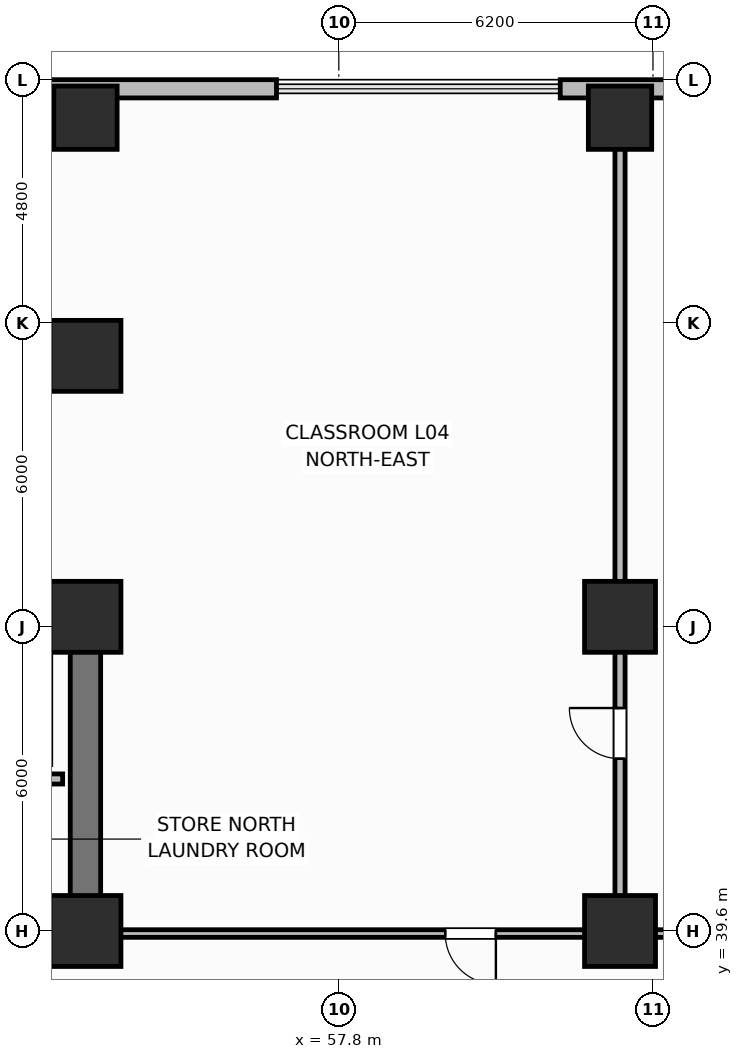
"""IFC4 building model, lengths in metres.
Left out: names, types, materials, properties, quantities, classifications, styles, units other than length and angle.
Written with IfcOpenShell. Run it as: python <this file> out.ifc"""

import sys

from ifc_helpers import new_model, si_unit, direction, frame, frame_2d, origin, origin_2d, place, context, subcontext, project, spatial, rectangle, extrude, element, fill, save


model = new_model("IFC4")
c1 = context("Model", 3, precision=1e-05, world=origin(), true_north=direction((0.0, 1.0)))
c2 = subcontext(c1, "Body", "Model", "MODEL_VIEW")
j1 = project(units=[si_unit("LENGTHUNIT", "METRE"), si_unit("PLANEANGLEUNIT", "RADIAN")], contexts=[c1])
p1 = place(None, origin())
s1 = spatial("IfcSite", under=j1, at=p1, CompositionType="ELEMENT")
p2 = place(p1, origin())
s2 = spatial("IfcBuilding", under=s1, at=p2, CompositionType="ELEMENT")
p3 = place(p2, frame((0.0, 0.0, 20.1)))
s3 = spatial("IfcBuildingStorey", under=s2, at=p3, CompositionType="ELEMENT", Elevation=20.1)
p4 = place(p3, frame((25.6, 45.8, 0.0), z_axis=(0.0, 0.0, 1.0), x_axis=(1.0, 0.0, 0.0)))
e1 = element("IfcWall", 1, at=p4, inside=s3, PredefinedType="SHEAR", context=c2, shape_type="SweptSolid", body=[
    extrude(rectangle(XDim=27.2, YDim=0.6, at=frame_2d((13.6, 0.0))), origin(), (0.0, 0.0, 1.0), 4.5),
])
p5 = place(p3, frame((52.8, 39.9, 0.0), z_axis=(0.0, 0.0, 1.0), x_axis=(0.0, 1.0, 0.0)))
e2 = element("IfcWall", 2, at=p5, inside=s3, PredefinedType="SHEAR", context=c2, shape_type="SweptSolid", body=[
    extrude(rectangle(XDim=5.6, YDim=0.6, at=frame_2d((2.8, 0.0))), origin(), (0.0, 0.0, 1.0), 4.5),
])
p6 = place(p3, frame((52.8, 39.6, 0.0), z_axis=(0.0, 0.0, 1.0), x_axis=(-1.0, 0.0, 0.0)))
e3 = element("IfcWall", 3, at=p6, inside=s3, PredefinedType="SHEAR", context=c2, shape_type="SweptSolid", body=[
    extrude(rectangle(XDim=27.2, YDim=0.6, at=frame_2d((13.6, 0.0))), origin(), (0.0, 0.0, 1.0), 4.5),
])
p7 = place(p6, frame((24.2, 0.0, 0.0)))
e4 = element("IfcOpeningElement", 4, at=p7, cuts=e3, PredefinedType="OPENING", context=c2, shape_type="SweptSolid", body=[
    extrude(rectangle(XDim=1.1, YDim=2.15, at=frame_2d((0.55, 1.075))), frame((0.0, 0.31, 0.0), z_axis=(0.0, -1.0, 0.0), x_axis=(1.0, 0.0, 0.0)), (0.0, 0.0, 1.0), 0.62),
])
p8 = place(p6, frame((20.55, 0.0, 0.0)))
e5 = element("IfcOpeningElement", 5, at=p8, cuts=e3, PredefinedType="OPENING", context=c2, shape_type="SweptSolid", body=[
    extrude(rectangle(XDim=0.95, YDim=2.1, at=frame_2d((0.475, 1.05))), frame((0.0, 0.31, 0.0), z_axis=(0.0, -1.0, 0.0), x_axis=(1.0, 0.0, 0.0)), (0.0, 0.0, 1.0), 0.62),
])
p9 = place(p6, frame((15.1, 0.0, 0.0)))
e6 = element("IfcOpeningElement", 6, at=p9, cuts=e3, PredefinedType="OPENING", context=c2, shape_type="SweptSolid", body=[
    extrude(rectangle(XDim=1.2, YDim=2.15, at=frame_2d((0.6, 1.075))), frame((0.0, 0.31, 0.0), z_axis=(0.0, -1.0, 0.0), x_axis=(1.0, 0.0, 0.0)), (0.0, 0.0, 1.0), 0.62),
])
p10 = place(p6, frame((11.6, 0.0, 0.0)))
e7 = element("IfcOpeningElement", 7, at=p10, cuts=e3, PredefinedType="OPENING", context=c2, shape_type="SweptSolid", body=[
    extrude(rectangle(XDim=0.9, YDim=2.1, at=frame_2d((0.45, 1.05))), frame((0.0, 0.31, 0.0), z_axis=(0.0, -1.0, 0.0), x_axis=(1.0, 0.0, 0.0)), (0.0, 0.0, 1.0), 0.62),
])
p11 = place(p6, frame((4.8, 0.0, 0.0)))
e8 = element("IfcOpeningElement", 8, at=p11, cuts=e3, PredefinedType="OPENING", context=c2, shape_type="SweptSolid", body=[
    extrude(rectangle(XDim=0.85, YDim=2.1, at=frame_2d((0.425, 1.05))), frame((0.0, 0.31, 0.0), z_axis=(0.0, -1.0, 0.0), x_axis=(1.0, 0.0, 0.0)), (0.0, 0.0, 1.0), 0.62),
])
p12 = place(p6, frame((1.9, 0.0, 0.0)))
e9 = element("IfcOpeningElement", 9, at=p12, cuts=e3, PredefinedType="OPENING", context=c2, shape_type="SweptSolid", body=[
    extrude(rectangle(XDim=0.85, YDim=2.1, at=frame_2d((0.425, 1.05))), frame((0.0, 0.31, 0.0), z_axis=(0.0, -1.0, 0.0), x_axis=(1.0, 0.0, 0.0)), (0.0, 0.0, 1.0), 0.62),
])
for number, where, z_axis, x_axis in (
    (10, (52.8, 39.6, 0.0), (0.0, 0.0, 1.0), (1.0, 0.0, 0.0)),
    (11, (52.8, 45.8, 0.0), (0.0, 0.0, 1.0), (1.0, 0.0, 0.0)),
):
    element("IfcColumn", number, at=place(p3, frame(where, z_axis=z_axis, x_axis=x_axis)), inside=s3, PredefinedType="COLUMN", context=c2, shape_type="SweptSolid", body=[
        extrude(rectangle(XDim=1.4, YDim=1.4, at=origin_2d()), origin(), (0.0, 0.0, 1.0), 4.5),
    ])
for number, where, z_axis, x_axis in (
    (12, (52.8, 55.65, 0.0), (0.0, 0.0, 1.0), (1.0, 0.0, 0.0)),
    (13, (63.35, 55.65, 0.0), (0.0, 0.0, 1.0), (1.0, 0.0, 0.0)),
):
    element("IfcColumn", number, at=place(p3, frame(where, z_axis=z_axis, x_axis=x_axis)), inside=s3, PredefinedType="COLUMN", context=c2, shape_type="SweptSolid", body=[
        extrude(rectangle(XDim=1.25, YDim=1.25, at=origin_2d()), origin(), (0.0, 0.0, 1.0), 4.5),
    ])
for number, where, z_axis, x_axis in (
    (14, (52.8, 50.95, 0.0), (0.0, 0.0, 1.0), (1.0, 0.0, 0.0)),
    (15, (63.35, 39.6, 0.0), (0.0, 0.0, 1.0), (1.0, 0.0, 0.0)),
    (16, (63.35, 45.8, 0.0), (0.0, 0.0, 1.0), (1.0, 0.0, 0.0)),
):
    element("IfcColumn", number, at=place(p3, frame(where, z_axis=z_axis, x_axis=x_axis)), inside=s3, PredefinedType="COLUMN", context=c2, shape_type="SweptSolid", body=[
        extrude(rectangle(XDim=1.4, YDim=1.4, at=origin_2d()), origin(), (0.0, 0.0, 1.0), 4.5),
    ])
p13 = place(p3, frame((77.42, 56.22, 0.0), z_axis=(0.0, 0.0, 1.0), x_axis=(-1.0, 0.0, 0.0)))
e17 = element("IfcWall", 17, at=p13, inside=s3, PredefinedType="SOLIDWALL", context=c2, shape_type="SweptSolid", body=[
    extrude(rectangle(XDim=15.25, YDim=0.36, at=frame_2d((7.625, 0.0))), origin(), (0.0, 0.0, 1.0), 2.3),
])
p14 = place(p13, frame((1.925, 0.0, 0.3)))
e18 = element("IfcOpeningElement", 18, at=p14, cuts=e17, PredefinedType="OPENING", context=c2, shape_type="SweptSolid", body=[
    extrude(rectangle(XDim=2.1, YDim=2.2, at=frame_2d((1.05, 1.1))), frame((0.0, 0.19, 0.0), z_axis=(0.0, -1.0, 0.0), x_axis=(1.0, 0.0, 0.0)), (0.0, 0.0, 1.0), 0.38),
])
p15 = place(p13, frame((7.625, 0.0, 0.3)))
e19 = element("IfcOpeningElement", 19, at=p15, cuts=e17, PredefinedType="OPENING", context=c2, shape_type="SweptSolid", body=[
    extrude(rectangle(XDim=2.1, YDim=2.2, at=frame_2d((1.05, 1.1))), frame((0.0, 0.19, 0.0), z_axis=(0.0, -1.0, 0.0), x_axis=(1.0, 0.0, 0.0)), (0.0, 0.0, 1.0), 0.38),
])
p16 = place(p13, frame((10.525, 0.0, 0.3)))
e20 = element("IfcOpeningElement", 20, at=p16, cuts=e17, PredefinedType="OPENING", context=c2, shape_type="SweptSolid", body=[
    extrude(rectangle(XDim=2.1, YDim=2.2, at=frame_2d((1.05, 1.1))), frame((0.0, 0.19, 0.0), z_axis=(0.0, -1.0, 0.0), x_axis=(1.0, 0.0, 0.0)), (0.0, 0.0, 1.0), 0.38),
])
p17 = place(p3, frame((56.57, 56.22, 0.0), z_axis=(0.0, 0.0, 1.0), x_axis=(-1.0, 0.0, 0.0)))
e21 = element("IfcWall", 21, at=p17, inside=s3, PredefinedType="SOLIDWALL", context=c2, shape_type="SweptSolid", body=[
    extrude(rectangle(XDim=55.59, YDim=0.36, at=frame_2d((27.795, 0.0))), origin(), (0.0, 0.0, 1.0), 2.3),
])
p18 = place(p17, frame((5.029, 0.0, 0.3)))
e22 = element("IfcOpeningElement", 22, at=p18, cuts=e21, PredefinedType="OPENING", context=c2, shape_type="SweptSolid", body=[
    extrude(rectangle(XDim=2.1, YDim=2.2, at=frame_2d((1.05, 1.1))), frame((0.0, 0.19, 0.0), z_axis=(0.0, -1.0, 0.0), x_axis=(1.0, 0.0, 0.0)), (0.0, 0.0, 1.0), 0.38),
])
p19 = place(p17, frame((8.648, 0.0, 0.3)))
e23 = element("IfcOpeningElement", 23, at=p19, cuts=e21, PredefinedType="OPENING", context=c2, shape_type="SweptSolid", body=[
    extrude(rectangle(XDim=2.1, YDim=2.2, at=frame_2d((1.05, 1.1))), frame((0.0, 0.19, 0.0), z_axis=(0.0, -1.0, 0.0), x_axis=(1.0, 0.0, 0.0)), (0.0, 0.0, 1.0), 0.38),
])
p20 = place(p17, frame((12.268, 0.0, 0.3)))
e24 = element("IfcOpeningElement", 24, at=p20, cuts=e21, PredefinedType="OPENING", context=c2, shape_type="SweptSolid", body=[
    extrude(rectangle(XDim=2.1, YDim=2.2, at=frame_2d((1.05, 1.1))), frame((0.0, 0.19, 0.0), z_axis=(0.0, -1.0, 0.0), x_axis=(1.0, 0.0, 0.0)), (0.0, 0.0, 1.0), 0.38),
])
p21 = place(p17, frame((19.506, 0.0, 0.3)))
e25 = element("IfcOpeningElement", 25, at=p21, cuts=e21, PredefinedType="OPENING", context=c2, shape_type="SweptSolid", body=[
    extrude(rectangle(XDim=2.1, YDim=2.2, at=frame_2d((1.05, 1.1))), frame((0.0, 0.19, 0.0), z_axis=(0.0, -1.0, 0.0), x_axis=(1.0, 0.0, 0.0)), (0.0, 0.0, 1.0), 0.38),
])
p22 = place(p17, frame((23.126, 0.0, 0.3)))
e26 = element("IfcOpeningElement", 26, at=p22, cuts=e21, PredefinedType="OPENING", context=c2, shape_type="SweptSolid", body=[
    extrude(rectangle(XDim=2.1, YDim=2.2, at=frame_2d((1.05, 1.1))), frame((0.0, 0.19, 0.0), z_axis=(0.0, -1.0, 0.0), x_axis=(1.0, 0.0, 0.0)), (0.0, 0.0, 1.0), 0.38),
])
p23 = place(p17, frame((26.745, 0.0, 0.3)))
e27 = element("IfcOpeningElement", 27, at=p23, cuts=e21, PredefinedType="OPENING", context=c2, shape_type="SweptSolid", body=[
    extrude(rectangle(XDim=2.1, YDim=2.2, at=frame_2d((1.05, 1.1))), frame((0.0, 0.19, 0.0), z_axis=(0.0, -1.0, 0.0), x_axis=(1.0, 0.0, 0.0)), (0.0, 0.0, 1.0), 0.38),
])
p24 = place(p17, frame((33.984, 0.0, 0.3)))
e28 = element("IfcOpeningElement", 28, at=p24, cuts=e21, PredefinedType="OPENING", context=c2, shape_type="SweptSolid", body=[
    extrude(rectangle(XDim=2.1, YDim=2.2, at=frame_2d((1.05, 1.1))), frame((0.0, 0.19, 0.0), z_axis=(0.0, -1.0, 0.0), x_axis=(1.0, 0.0, 0.0)), (0.0, 0.0, 1.0), 0.38),
])
p25 = place(p17, frame((37.603, 0.0, 0.3)))
e29 = element("IfcOpeningElement", 29, at=p25, cuts=e21, PredefinedType="OPENING", context=c2, shape_type="SweptSolid", body=[
    extrude(rectangle(XDim=2.1, YDim=2.2, at=frame_2d((1.05, 1.1))), frame((0.0, 0.19, 0.0), z_axis=(0.0, -1.0, 0.0), x_axis=(1.0, 0.0, 0.0)), (0.0, 0.0, 1.0), 0.38),
])
p26 = place(p17, frame((44.842, 0.0, 0.3)))
e30 = element("IfcOpeningElement", 30, at=p26, cuts=e21, PredefinedType="OPENING", context=c2, shape_type="SweptSolid", body=[
    extrude(rectangle(XDim=2.1, YDim=2.2, at=frame_2d((1.05, 1.1))), frame((0.0, 0.19, 0.0), z_axis=(0.0, -1.0, 0.0), x_axis=(1.0, 0.0, 0.0)), (0.0, 0.0, 1.0), 0.38),
])
p27 = place(p17, frame((52.08, 0.0, 0.3)))
e31 = element("IfcOpeningElement", 31, at=p27, cuts=e21, PredefinedType="OPENING", context=c2, shape_type="SweptSolid", body=[
    extrude(rectangle(XDim=2.1, YDim=2.2, at=frame_2d((1.05, 1.1))), frame((0.0, 0.19, 0.0), z_axis=(0.0, -1.0, 0.0), x_axis=(1.0, 0.0, 0.0)), (0.0, 0.0, 1.0), 0.38),
])
p28 = place(p3, frame((52.35, 42.6, 0.0), z_axis=(0.0, 0.0, 1.0), x_axis=(-1.0, 0.0, 0.0)))
e32 = element("IfcWall", 32, at=p28, inside=s3, PredefinedType="PARTITIONING", context=c2, shape_type="SweptSolid", body=[
    extrude(rectangle(XDim=8.8, YDim=0.2, at=frame_2d((4.4, 0.0))), origin(), (0.0, 0.0, 1.0), 2.26),
])
p29 = place(p3, frame((63.35, 39.6, 0.0), z_axis=(0.0, 0.0, 1.0), x_axis=(0.0, 1.0, 0.0)))
e33 = element("IfcWall", 33, at=p29, inside=s3, PredefinedType="PARTITIONING", context=c2, shape_type="SweptSolid", body=[
    extrude(rectangle(XDim=16.4, YDim=0.2, at=frame_2d((8.2, 0.0))), origin(), (0.0, 0.0, 1.0), 2.26),
])
p30 = place(p29, frame((3.4, 0.0, 0.0)))
e34 = element("IfcOpeningElement", 34, at=p30, cuts=e33, PredefinedType="OPENING", context=c2, shape_type="SweptSolid", body=[
    extrude(rectangle(XDim=1.0, YDim=2.15, at=frame_2d((0.5, 1.075))), frame((0.0, 0.11, 0.0), z_axis=(0.0, -1.0, 0.0), x_axis=(1.0, 0.0, 0.0)), (0.0, 0.0, 1.0), 0.22),
])
p31 = place(p3, frame((66.4, 39.55, 0.0), z_axis=(0.0, 0.0, 1.0), x_axis=(-1.0, 0.0, 0.0)))
e35 = element("IfcWall", 35, at=p31, inside=s3, PredefinedType="PARTITIONING", context=c2, shape_type="SweptSolid", body=[
    extrude(rectangle(XDim=13.25, YDim=0.15, at=frame_2d((6.625, 0.0))), origin(), (0.0, 0.0, 1.0), 2.26),
])
p32 = place(p31, frame((5.5, 0.0, 0.0)))
e36 = element("IfcOpeningElement", 36, at=p32, cuts=e35, PredefinedType="OPENING", context=c2, shape_type="SweptSolid", body=[
    extrude(rectangle(XDim=1.0, YDim=2.15, at=frame_2d((0.5, 1.075))), frame((0.0, 0.085, 0.0), z_axis=(0.0, -1.0, 0.0), x_axis=(1.0, 0.0, 0.0)), (0.0, 0.0, 1.0), 0.17),
])
p33 = place(p30, origin())
e37 = element("IfcDoor", 37, at=p33, inside=s3, OperationType="SINGLE_SWING_RIGHT", PredefinedType="DOOR", context=c2, shape_type="SweptSolid", body=[
    extrude(rectangle(XDim=1.0, YDim=2.15, at=frame_2d((0.5, 1.075))), frame((0.0, 0.025, 0.0), z_axis=(0.0, -1.0, 0.0), x_axis=(1.0, 0.0, 0.0)), (0.0, 0.0, 1.0), 0.05),
])
fill(e34, e37)
p34 = place(p32, origin())
e38 = element("IfcDoor", 38, at=p34, inside=s3, OperationType="SINGLE_SWING_LEFT", PredefinedType="DOOR", context=c2, shape_type="SweptSolid", body=[
    extrude(rectangle(XDim=1.0, YDim=2.15, at=frame_2d((0.5, 1.075))), frame((0.0, 0.025, 0.0), z_axis=(0.0, -1.0, 0.0), x_axis=(1.0, 0.0, 0.0)), (0.0, 0.0, 1.0), 0.05),
])
fill(e36, e38)
save(model, sys.argv[1])
